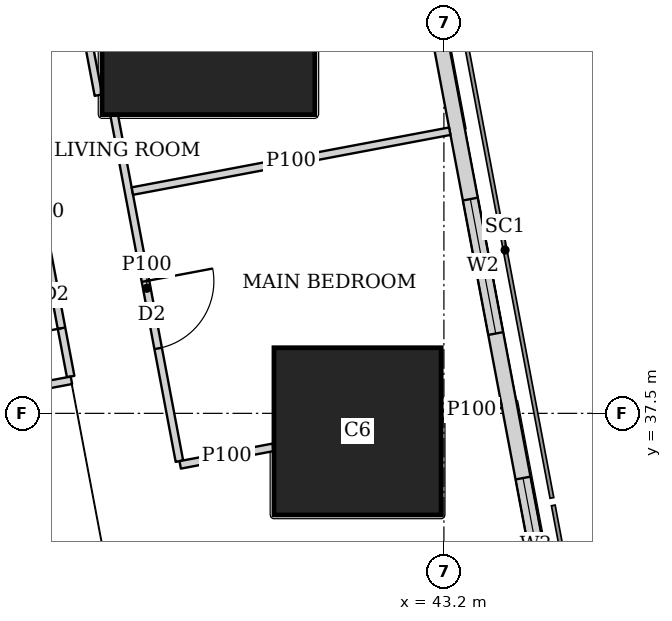
"""IFC4 building model, lengths in metres.
Left out: names, types, materials, properties, quantities, classifications, styles, units other than length and angle.
Written with IfcOpenShell. Run it as: python <this file> out.ifc"""

import sys

from ifc_helpers import new_model, si_unit, direction, frame, frame_2d, origin, origin_2d, place, context, subcontext, project, spatial, rectangle, extrude, element, fill, save


model = new_model("IFC4")
c1 = context("Model", 3, precision=1e-05, world=origin(), true_north=direction((0.0, 1.0)))
c2 = subcontext(c1, "Body", "Model", "MODEL_VIEW")
j1 = project(units=[si_unit("LENGTHUNIT", "METRE"), si_unit("PLANEANGLEUNIT", "RADIAN")], contexts=[c1])
p1 = place(None, origin())
s1 = spatial("IfcSite", under=j1, at=p1, CompositionType="ELEMENT")
p2 = place(p1, origin())
s2 = spatial("IfcBuilding", under=s1, at=p2, CompositionType="ELEMENT")
p3 = place(p2, frame((0.0, 0.0, 126.65)))
s3 = spatial("IfcBuildingStorey", under=s2, at=p3, CompositionType="ELEMENT", Elevation=126.65)
p4 = place(p3, frame((42.064, 37.263, 0.0), z_axis=(0.0, 0.0, 1.0), x_axis=(1.0, 0.0, 0.0)))
e1 = element("IfcColumn", 1, at=p4, inside=s3, PredefinedType="COLUMN", context=c2, shape_type="SweptSolid", body=[
    extrude(rectangle(XDim=2.2, YDim=2.2, at=origin_2d()), origin(), (0.0, 0.0, 1.0), 3.75),
])
p5 = place(p3, frame((40.102, 42.83, 0.0), z_axis=(0.0, 0.0, 1.0), x_axis=(1.0, 0.0, 0.0)))
e2 = element("IfcColumn", 2, at=p5, inside=s3, PredefinedType="COLUMN", context=c2, shape_type="SweptSolid", body=[
    extrude(rectangle(XDim=2.8, YDim=2.8, at=origin_2d()), origin(), (0.0, 0.0, 1.0), 3.75),
])
p6 = place(p3, frame((50.653, 2.703, 0.0), z_axis=(0.0, 0.0, 1.0), x_axis=(-0.185612026696, 0.982623109613, 0.0)))
e3 = element("IfcWall", 3, at=p6, inside=s3, PredefinedType="SOLIDWALL", context=c2, shape_type="SweptSolid", body=[
    extrude(rectangle(XDim=41.393, YDim=0.2, at=frame_2d((20.697, 0.0))), origin(), (0.0, 0.0, 1.0), 3.45),
])
p7 = place(p6, frame((1.633, 0.0, 0.9)))
e4 = element("IfcOpeningElement", 4, at=p7, cuts=e3, PredefinedType="OPENING", context=c2, shape_type="SweptSolid", body=[
    extrude(rectangle(XDim=1.8, YDim=1.5, at=frame_2d((0.9, 0.75))), frame((0.0, 0.11, 0.0), z_axis=(0.0, -1.0, 0.0), x_axis=(1.0, 0.0, 0.0)), (0.0, 0.0, 1.0), 0.22),
])
p8 = place(p6, frame((6.032, 0.0, 0.9)))
e5 = element("IfcOpeningElement", 5, at=p8, cuts=e3, PredefinedType="OPENING", context=c2, shape_type="SweptSolid", body=[
    extrude(rectangle(XDim=1.8, YDim=1.5, at=frame_2d((0.9, 0.75))), frame((0.0, 0.11, 0.0), z_axis=(0.0, -1.0, 0.0), x_axis=(1.0, 0.0, 0.0)), (0.0, 0.0, 1.0), 0.22),
])
p9 = place(p6, frame((9.848, 0.0, 0.9)))
e6 = element("IfcOpeningElement", 6, at=p9, cuts=e3, PredefinedType="OPENING", context=c2, shape_type="SweptSolid", body=[
    extrude(rectangle(XDim=1.8, YDim=1.5, at=frame_2d((0.9, 0.75))), frame((0.0, 0.11, 0.0), z_axis=(0.0, -1.0, 0.0), x_axis=(1.0, 0.0, 0.0)), (0.0, 0.0, 1.0), 0.22),
])
p10 = place(p6, frame((13.664, 0.0, 0.9)))
e7 = element("IfcOpeningElement", 7, at=p10, cuts=e3, PredefinedType="OPENING", context=c2, shape_type="SweptSolid", body=[
    extrude(rectangle(XDim=1.8, YDim=1.5, at=frame_2d((0.9, 0.75))), frame((0.0, 0.11, 0.0), z_axis=(0.0, -1.0, 0.0), x_axis=(1.0, 0.0, 0.0)), (0.0, 0.0, 1.0), 0.22),
])
p11 = place(p6, frame((17.481, 0.0, 0.9)))
e8 = element("IfcOpeningElement", 8, at=p11, cuts=e3, PredefinedType="OPENING", context=c2, shape_type="SweptSolid", body=[
    extrude(rectangle(XDim=1.8, YDim=1.5, at=frame_2d((0.9, 0.75))), frame((0.0, 0.11, 0.0), z_axis=(0.0, -1.0, 0.0), x_axis=(1.0, 0.0, 0.0)), (0.0, 0.0, 1.0), 0.22),
])
p12 = place(p6, frame((21.297, 0.0, 0.9)))
e9 = element("IfcOpeningElement", 9, at=p12, cuts=e3, PredefinedType="OPENING", context=c2, shape_type="SweptSolid", body=[
    extrude(rectangle(XDim=1.8, YDim=1.5, at=frame_2d((0.9, 0.75))), frame((0.0, 0.11, 0.0), z_axis=(0.0, -1.0, 0.0), x_axis=(1.0, 0.0, 0.0)), (0.0, 0.0, 1.0), 0.22),
])
p13 = place(p6, frame((25.113, 0.0, 0.9)))
e10 = element("IfcOpeningElement", 10, at=p13, cuts=e3, PredefinedType="OPENING", context=c2, shape_type="SweptSolid", body=[
    extrude(rectangle(XDim=1.8, YDim=1.5, at=frame_2d((0.9, 0.75))), frame((0.0, 0.11, 0.0), z_axis=(0.0, -1.0, 0.0), x_axis=(1.0, 0.0, 0.0)), (0.0, 0.0, 1.0), 0.22),
])
p14 = place(p6, frame((28.93, 0.0, 0.9)))
e11 = element("IfcOpeningElement", 11, at=p14, cuts=e3, PredefinedType="OPENING", context=c2, shape_type="SweptSolid", body=[
    extrude(rectangle(XDim=1.8, YDim=1.5, at=frame_2d((0.9, 0.75))), frame((0.0, 0.11, 0.0), z_axis=(0.0, -1.0, 0.0), x_axis=(1.0, 0.0, 0.0)), (0.0, 0.0, 1.0), 0.22),
])
p15 = place(p6, frame((32.746, 0.0, 0.9)))
e12 = element("IfcOpeningElement", 12, at=p15, cuts=e3, PredefinedType="OPENING", context=c2, shape_type="SweptSolid", body=[
    extrude(rectangle(XDim=1.8, YDim=1.5, at=frame_2d((0.9, 0.75))), frame((0.0, 0.11, 0.0), z_axis=(0.0, -1.0, 0.0), x_axis=(1.0, 0.0, 0.0)), (0.0, 0.0, 1.0), 0.22),
])
p16 = place(p6, frame((36.481, 0.0, 0.9)))
e13 = element("IfcOpeningElement", 13, at=p16, cuts=e3, PredefinedType="OPENING", context=c2, shape_type="SweptSolid", body=[
    extrude(rectangle(XDim=1.8, YDim=1.5, at=frame_2d((0.9, 0.75))), frame((0.0, 0.11, 0.0), z_axis=(0.0, -1.0, 0.0), x_axis=(1.0, 0.0, 0.0)), (0.0, 0.0, 1.0), 0.22),
])
p17 = place(p3, frame((33.896, 42.929, 0.0), z_axis=(0.0, 0.0, 1.0), x_axis=(0.1855961604, -0.982626106535, 0.0)))
e14 = element("IfcWall", 14, at=p17, inside=s3, PredefinedType="SOLIDWALL", context=c2, shape_type="SweptSolid", body=[
    extrude(rectangle(XDim=41.456, YDim=0.15, at=frame_2d((20.728, 0.0))), origin(), (0.0, 0.0, 1.0), 2.45),
])
p18 = place(p17, frame((7.893, 0.0, 0.0)))
e15 = element("IfcOpeningElement", 15, at=p18, cuts=e14, PredefinedType="OPENING", context=c2, shape_type="SweptSolid", body=[
    extrude(rectangle(XDim=1.0, YDim=2.1, at=frame_2d((0.5, 1.05))), frame((0.0, 0.085, 0.0), z_axis=(0.0, -1.0, 0.0), x_axis=(1.0, 0.0, 0.0)), (0.0, 0.0, 1.0), 0.17),
])
p19 = place(p17, frame((12.468, 0.0, 0.0)))
e16 = element("IfcOpeningElement", 16, at=p19, cuts=e14, PredefinedType="OPENING", context=c2, shape_type="SweptSolid", body=[
    extrude(rectangle(XDim=1.0, YDim=2.1, at=frame_2d((0.5, 1.05))), frame((0.0, 0.085, 0.0), z_axis=(0.0, -1.0, 0.0), x_axis=(1.0, 0.0, 0.0)), (0.0, 0.0, 1.0), 0.17),
])
p20 = place(p17, frame((20.101, 0.0, 0.0)))
e17 = element("IfcOpeningElement", 17, at=p20, cuts=e14, PredefinedType="OPENING", context=c2, shape_type="SweptSolid", body=[
    extrude(rectangle(XDim=1.0, YDim=2.1, at=frame_2d((0.5, 1.05))), frame((0.0, 0.085, 0.0), z_axis=(0.0, -1.0, 0.0), x_axis=(1.0, 0.0, 0.0)), (0.0, 0.0, 1.0), 0.17),
])
p21 = place(p17, frame((31.064, 0.0, 0.0)))
e18 = element("IfcOpeningElement", 18, at=p21, cuts=e14, PredefinedType="OPENING", context=c2, shape_type="SweptSolid", body=[
    extrude(rectangle(XDim=1.0, YDim=2.1, at=frame_2d((0.5, 1.05))), frame((0.0, 0.085, 0.0), z_axis=(0.0, -1.0, 0.0), x_axis=(1.0, 0.0, 0.0)), (0.0, 0.0, 1.0), 0.17),
])
p22 = place(p3, frame((38.654, 41.686, 0.0), z_axis=(0.0, 0.0, 1.0), x_axis=(-0.185676896978, 0.982610853761, 0.0)))
e19 = element("IfcWall", 19, at=p22, inside=s3, PredefinedType="PARTITIONING", context=c2, shape_type="SweptSolid", body=[
    extrude(rectangle(XDim=4.034, YDim=0.1, at=frame_2d((2.017, 0.0))), origin(), (0.0, 0.0, 1.0), 2.0),
])
p23 = place(p3, frame((38.862, 41.42, 0.0), z_axis=(0.0, 0.0, 1.0), x_axis=(0.185332907641, -0.982675792592, 0.0)))
e20 = element("IfcWall", 20, at=p23, inside=s3, PredefinedType="PARTITIONING", context=c2, shape_type="SweptSolid", body=[
    extrude(rectangle(XDim=4.629, YDim=0.1, at=frame_2d((2.314, 0.0))), origin(), (0.0, 0.0, 1.0), 3.45),
])
p24 = place(p23, frame((2.22, 0.0, 0.0)))
e21 = element("IfcOpeningElement", 21, at=p24, cuts=e20, PredefinedType="OPENING", context=c2, shape_type="SweptSolid", body=[
    extrude(rectangle(XDim=0.9, YDim=2.1, at=frame_2d((0.45, 1.05))), frame((0.0, 0.06, 0.0), z_axis=(0.0, -1.0, 0.0), x_axis=(1.0, 0.0, 0.0)), (0.0, 0.0, 1.0), 0.12),
])
p25 = place(p3, frame((37.472, 42.309, 0.0), z_axis=(0.0, 0.0, 1.0), x_axis=(0.185641287362, -0.982617581985, 0.0)))
e22 = element("IfcWall", 22, at=p25, inside=s3, PredefinedType="PARTITIONING", context=c2, shape_type="SweptSolid", body=[
    extrude(rectangle(XDim=4.402, YDim=0.1, at=frame_2d((2.201, 0.0))), origin(), (0.0, 0.0, 1.0), 3.45),
])
p26 = place(p25, frame((2.854, 0.0, 0.0)))
e23 = element("IfcOpeningElement", 23, at=p26, cuts=e22, PredefinedType="OPENING", context=c2, shape_type="SweptSolid", body=[
    extrude(rectangle(XDim=0.9, YDim=2.1, at=frame_2d((0.45, 1.05))), frame((0.0, 0.06, 0.0), z_axis=(0.0, -1.0, 0.0), x_axis=(1.0, 0.0, 0.0)), (0.0, 0.0, 1.0), 0.12),
])
p27 = place(p3, frame((43.277, 41.212, 0.0), z_axis=(0.0, 0.0, 1.0), x_axis=(-0.982665405803, -0.185387972203, 0.0)))
e24 = element("IfcWall", 24, at=p27, inside=s3, PredefinedType="PARTITIONING", context=c2, shape_type="SweptSolid", body=[
    extrude(rectangle(XDim=4.25, YDim=0.1, at=frame_2d((2.125, 0.0))), origin(), (0.0, 0.0, 1.0), 2.0),
])
p28 = place(p3, frame((43.955, 37.62, 0.0), z_axis=(0.0, 0.0, 1.0), x_axis=(-0.98247004097, -0.186420542316, 0.0)))
e25 = element("IfcWall", 25, at=p28, inside=s3, PredefinedType="PARTITIONING", context=c2, shape_type="SweptSolid", body=[
    extrude(rectangle(XDim=0.795, YDim=0.1, at=frame_2d((0.397, 0.0))), origin(), (0.0, 0.0, 1.0), 2.0),
])
p29 = place(p3, frame((40.954, 37.053, 0.0), z_axis=(0.0, 0.0, 1.0), x_axis=(-0.982663001154, -0.185400717808, 0.0)))
e26 = element("IfcWall", 26, at=p29, inside=s3, PredefinedType="PARTITIONING", context=c2, shape_type="SweptSolid", body=[
    extrude(rectangle(XDim=1.246, YDim=0.1, at=frame_2d((0.623, 0.0))), origin(), (0.0, 0.0, 1.0), 2.0),
])
p30 = place(p3, frame((38.299, 37.935, 0.0), z_axis=(0.0, 0.0, 1.0), x_axis=(-0.982536828695, -0.186068213993, 0.0)))
e27 = element("IfcWall", 27, at=p30, inside=s3, PredefinedType="PARTITIONING", context=c2, shape_type="SweptSolid", body=[
    extrude(rectangle(XDim=1.515, YDim=0.1, at=frame_2d((0.758, 0.0))), origin(), (0.0, 0.0, 1.0), 3.45),
])
p31 = place(p15, origin())
e28 = element("IfcWindow", 28, at=p31, inside=s3, PartitioningType="SINGLE_PANEL", PredefinedType="WINDOW", context=c2, shape_type="SweptSolid", body=[
    extrude(rectangle(XDim=1.8, YDim=1.5, at=frame_2d((0.9, 0.75))), frame((0.0, 0.03, 0.0), z_axis=(0.0, -1.0, 0.0), x_axis=(1.0, 0.0, 0.0)), (0.0, 0.0, 1.0), 0.06),
])
fill(e12, e28)
p32 = place(p16, origin())
e29 = element("IfcWindow", 29, at=p32, inside=s3, PartitioningType="SINGLE_PANEL", PredefinedType="WINDOW", context=c2, shape_type="SweptSolid", body=[
    extrude(rectangle(XDim=1.8, YDim=1.5, at=frame_2d((0.9, 0.75))), frame((0.0, 0.03, 0.0), z_axis=(0.0, -1.0, 0.0), x_axis=(1.0, 0.0, 0.0)), (0.0, 0.0, 1.0), 0.06),
])
fill(e13, e29)
p33 = place(p24, origin())
e30 = element("IfcDoor", 30, at=p33, inside=s3, OperationType="SINGLE_SWING_LEFT", PredefinedType="DOOR", context=c2, shape_type="SweptSolid", body=[
    extrude(rectangle(XDim=0.9, YDim=2.1, at=frame_2d((0.45, 1.05))), frame((0.0, 0.025, 0.0), z_axis=(0.0, -1.0, 0.0), x_axis=(1.0, 0.0, 0.0)), (0.0, 0.0, 1.0), 0.05),
])
fill(e21, e30)
p34 = place(p26, origin())
e31 = element("IfcDoor", 31, at=p34, inside=s3, OperationType="SINGLE_SWING_LEFT", PredefinedType="DOOR", context=c2, shape_type="SweptSolid", body=[
    extrude(rectangle(XDim=0.9, YDim=2.1, at=frame_2d((0.45, 1.05))), frame((0.0, 0.025, 0.0), z_axis=(0.0, -1.0, 0.0), x_axis=(1.0, 0.0, 0.0)), (0.0, 0.0, 1.0), 0.05),
])
fill(e23, e31)
save(model, sys.argv[1])
